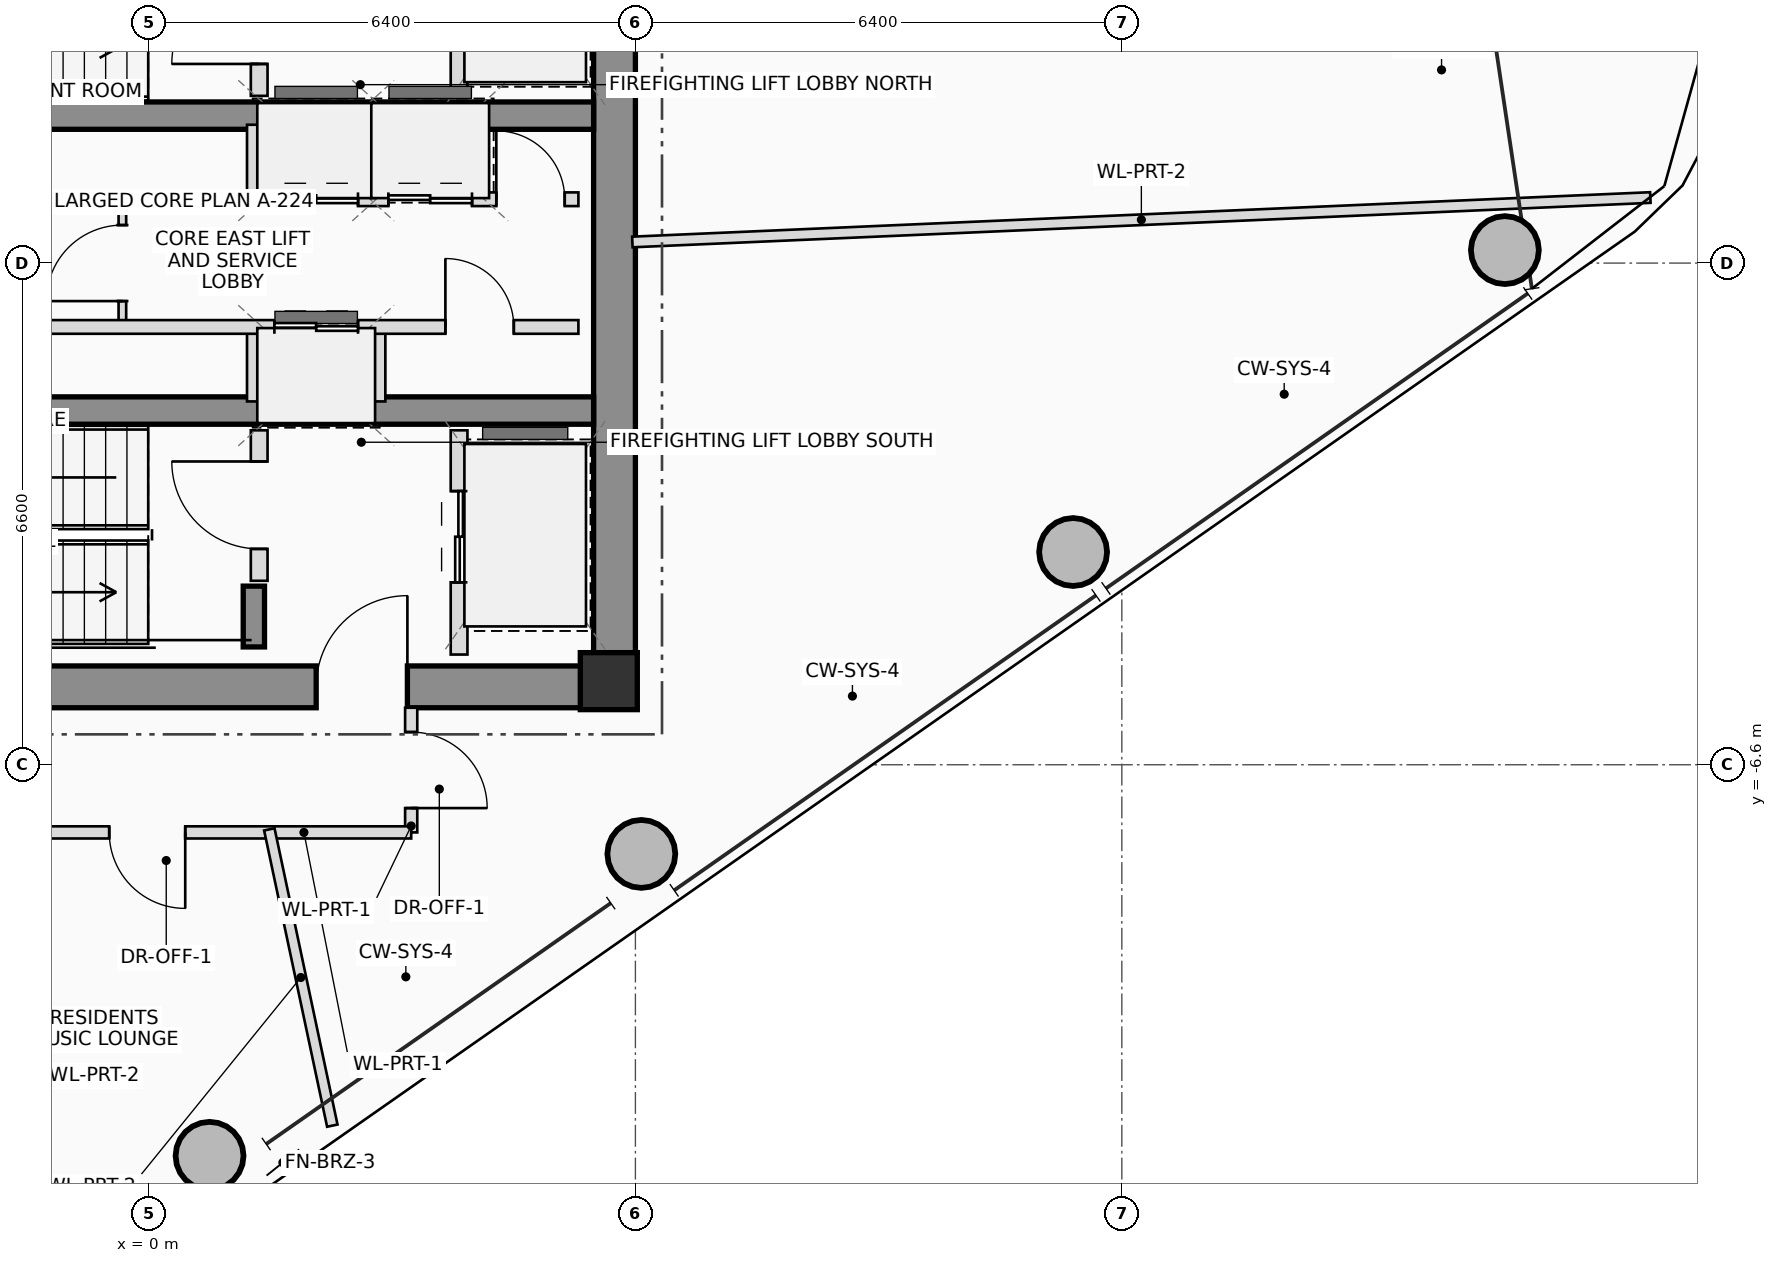
"""IFC4 building model, lengths in metres.
Left out: names, types, materials, properties, quantities, classifications, styles, units other than length and angle.
Written with IfcOpenShell. Run it as: python <this file> out.ifc"""

import sys

from ifc_helpers import new_model, si_unit, direction, frame, frame_2d, origin, origin_2d, place, context, subcontext, project, spatial, rectangle, hollow_circle, extrude, source, transform, mapped, element, fill, save


model = new_model("IFC4")
c1 = context("Model", 3, precision=1e-05, world=origin(), true_north=direction((0.0, 1.0)))
c2 = subcontext(c1, "Body", "Model", "MODEL_VIEW")
j1 = project(units=[si_unit("LENGTHUNIT", "METRE"), si_unit("PLANEANGLEUNIT", "RADIAN")], contexts=[c1])
p1 = place(None, origin())
s1 = spatial("IfcSite", under=j1, at=p1, CompositionType="ELEMENT")
p2 = place(p1, origin())
s2 = spatial("IfcBuilding", under=s1, at=p2, CompositionType="ELEMENT")
p3 = place(p2, frame((0.0, 0.0, 257.55)))
s3 = spatial("IfcBuildingStorey", under=s2, at=p3, CompositionType="ELEMENT", Elevation=257.55)
m1 = source(origin(), c2, "Body", "SweptSolid", [
    extrude(rectangle(XDim=0.75, YDim=0.75, at=origin_2d()), origin(), (0.0, 0.0, 1.0), 3.4),
])
p4 = place(p3, frame((6.05, -5.5, 0.0), z_axis=(0.0, 0.0, 1.0), x_axis=(1.0, 0.0, 0.0)))
e1 = element("IfcColumn", 1, at=p4, inside=s3, PredefinedType="COLUMN", context=c2, shape_type="MappedRepresentation", body=[
    mapped(m1, transform((0.0, 0.0, 0.0), scale=1.0)),
])
p5 = place(p3, frame((-6.4, -5.575, 0.0), z_axis=(0.0, 0.0, 1.0), x_axis=(1.0, 0.0, 0.0)))
e2 = element("IfcWall", 2, at=p5, inside=s3, PredefinedType="SHEAR", context=c2, shape_type="SweptSolid", body=[
    extrude(rectangle(XDim=12.8, YDim=0.55, at=frame_2d((6.4, 0.0))), origin(), (0.0, 0.0, 1.0), 3.4),
])
p6 = place(p5, frame((8.6, 0.0, 0.0)))
e3 = element("IfcOpeningElement", 3, at=p6, cuts=e2, PredefinedType="OPENING", context=c2, shape_type="SweptSolid", body=[
    extrude(rectangle(XDim=1.2, YDim=2.2, at=frame_2d((0.6, 1.1))), frame((0.0, 0.285, 0.0), z_axis=(0.0, -1.0, 0.0), x_axis=(1.0, 0.0, 0.0)), (0.0, 0.0, 1.0), 0.57),
])
p7 = place(p3, frame((6.125, -5.3, 0.0), z_axis=(0.0, 0.0, 1.0), x_axis=(0.0, 1.0, 0.0)))
e4 = element("IfcWall", 4, at=p7, inside=s3, PredefinedType="SHEAR", context=c2, shape_type="SweptSolid", body=[
    extrude(rectangle(XDim=10.6, YDim=0.55, at=frame_2d((5.3, 0.0))), origin(), (0.0, 0.0, 1.0), 3.4),
])
for number, where, z_axis, x_axis in (
    (5, (-5.85, 1.94, 0.0), (0.0, 0.0, 1.0), (1.0, 0.0, 0.0)),
    (6, (-5.85, -1.94, 0.0), (0.0, 0.0, 1.0), (1.0, 0.0, 0.0)),
):
    element("IfcWall", number, at=place(p3, frame(where, z_axis=z_axis, x_axis=x_axis)), inside=s3, PredefinedType="SHEAR", context=c2, shape_type="SweptSolid", body=[
        extrude(rectangle(XDim=11.7, YDim=0.36, at=frame_2d((5.85, 0.0))), origin(), (0.0, 0.0, 1.0), 3.4),
    ])
p8 = place(p3, frame((1.38, -5.05, 0.0), z_axis=(0.0, 0.0, 1.0), x_axis=(0.0, 1.0, 0.0)))
e7 = element("IfcWall", 7, at=p8, inside=s3, PredefinedType="SHEAR", context=c2, shape_type="SweptSolid", body=[
    extrude(rectangle(XDim=0.8, YDim=0.28, at=frame_2d((0.4, 0.0))), origin(), (0.0, 0.0, 1.0), 3.4),
])
m2 = source(origin(), c2, "Body", "SweptSolid", [
    extrude(hollow_circle(Radius=0.45, WallThickness=0.032, at=origin_2d()), origin(), (0.0, 0.0, 1.0), 3.4),
])
for number, where, z_axis, x_axis in (
    (8, (0.797, -11.745, 0.0), (0.0, 0.0, 1.0), (1.0, 0.0, 0.0)),
    (9, (6.478, -7.773, 0.0), (0.0, 0.0, 1.0), (1.0, 0.0, 0.0)),
    (10, (12.159, -3.801, 0.0), (0.0, 0.0, 1.0), (1.0, 0.0, 0.0)),
    (11, (17.84, 0.171, 0.0), (0.0, 0.0, 1.0), (1.0, 0.0, 0.0)),
):
    element("IfcColumn", number, at=place(p3, frame(where, z_axis=z_axis, x_axis=x_axis)), inside=s3, PredefinedType="COLUMN", context=c2, shape_type="MappedRepresentation", body=[
        mapped(m2, transform((0.0, 0.0, 0.0), scale=1.0)),
    ])
p9 = place(p3, frame((1.45, 2.2, 0.0), z_axis=(0.0, 0.0, 1.0), x_axis=(0.0, 1.0, 0.0)))
e12 = element("IfcWall", 12, at=p9, inside=s3, PredefinedType="PLUMBINGWALL", context=c2, shape_type="SweptSolid", body=[
    extrude(rectangle(XDim=1.98, YDim=0.22, at=frame_2d((0.99, 0.0))), origin(), (0.0, 0.0, 1.0), 3.2),
])
p10 = place(p9, frame((0.42, 0.0, 0.0)))
e13 = element("IfcOpeningElement", 13, at=p10, cuts=e12, PredefinedType="OPENING", context=c2, shape_type="SweptSolid", body=[
    extrude(rectangle(XDim=1.15, YDim=2.15, at=frame_2d((0.575, 1.075))), frame((0.0, 0.12, 0.0), z_axis=(0.0, -1.0, 0.0), x_axis=(1.0, 0.0, 0.0)), (0.0, 0.0, 1.0), 0.24),
])
p11 = place(p3, frame((4.08, 2.2, 0.0), z_axis=(0.0, 0.0, 1.0), x_axis=(0.0, 1.0, 0.0)))
e14 = element("IfcWall", 14, at=p11, inside=s3, PredefinedType="PLUMBINGWALL", context=c2, shape_type="SweptSolid", body=[
    extrude(rectangle(XDim=2.95, YDim=0.22, at=frame_2d((1.475, 0.0))), origin(), (0.0, 0.0, 1.0), 3.2),
])
p12 = place(p11, frame((0.75, 0.0, 0.0)))
e15 = element("IfcOpeningElement", 15, at=p12, cuts=e14, PredefinedType="OPENING", context=c2, shape_type="SweptSolid", body=[
    extrude(rectangle(XDim=1.2, YDim=2.25, at=frame_2d((0.6, 1.125))), frame((0.0, 0.12, 0.0), z_axis=(0.0, -1.0, 0.0), x_axis=(1.0, 0.0, 0.0)), (0.0, 0.0, 1.0), 0.24),
])
p13 = place(p3, frame((1.45, -4.18, 0.0), z_axis=(0.0, 0.0, 1.0), x_axis=(0.0, 1.0, 0.0)))
e16 = element("IfcWall", 16, at=p13, inside=s3, PredefinedType="PLUMBINGWALL", context=c2, shape_type="SweptSolid", body=[
    extrude(rectangle(XDim=1.98, YDim=0.22, at=frame_2d((0.99, 0.0))), origin(), (0.0, 0.0, 1.0), 3.2),
])
p14 = place(p13, frame((0.42, 0.0, 0.0)))
e17 = element("IfcOpeningElement", 17, at=p14, cuts=e16, PredefinedType="OPENING", context=c2, shape_type="SweptSolid", body=[
    extrude(rectangle(XDim=1.15, YDim=2.15, at=frame_2d((0.575, 1.075))), frame((0.0, 0.12, 0.0), z_axis=(0.0, -1.0, 0.0), x_axis=(1.0, 0.0, 0.0)), (0.0, 0.0, 1.0), 0.24),
])
p15 = place(p3, frame((4.08, -5.15, 0.0), z_axis=(0.0, 0.0, 1.0), x_axis=(0.0, 1.0, 0.0)))
e18 = element("IfcWall", 18, at=p15, inside=s3, PredefinedType="PLUMBINGWALL", context=c2, shape_type="SweptSolid", body=[
    extrude(rectangle(XDim=2.95, YDim=0.22, at=frame_2d((1.475, 0.0))), origin(), (0.0, 0.0, 1.0), 3.2),
])
p16 = place(p15, frame((0.95, 0.0, 0.0)))
e19 = element("IfcOpeningElement", 19, at=p16, cuts=e18, PredefinedType="OPENING", context=c2, shape_type="SweptSolid", body=[
    extrude(rectangle(XDim=1.2, YDim=2.25, at=frame_2d((0.6, 1.125))), frame((0.0, 0.12, 0.0), z_axis=(0.0, -1.0, 0.0), x_axis=(1.0, 0.0, 0.0)), (0.0, 0.0, 1.0), 0.24),
])
p17 = place(p3, frame((-0.35, -0.84, 0.0), z_axis=(0.0, 0.0, 1.0), x_axis=(0.0, 1.0, 0.0)))
e20 = element("IfcWall", 20, at=p17, inside=s3, PredefinedType="PARTITIONING", context=c2, shape_type="SweptSolid", body=[
    extrude(rectangle(XDim=1.68, YDim=0.1, at=frame_2d((0.84, 0.0))), origin(), (0.0, 0.0, 1.0), 3.2),
])
p18 = place(p17, frame((0.34, 0.0, 0.0)))
e21 = element("IfcOpeningElement", 21, at=p18, cuts=e20, PredefinedType="OPENING", context=c2, shape_type="SweptSolid", body=[
    extrude(rectangle(XDim=1.0, YDim=2.25, at=frame_2d((0.5, 1.125))), frame((0.0, 0.06, 0.0), z_axis=(0.0, -1.0, 0.0), x_axis=(1.0, 0.0, 0.0)), (0.0, 0.0, 1.0), 0.12),
])
for number, where, z_axis, x_axis in (
    (22, (1.38, 0.84, 0.0), (0.0, 0.0, 1.0), (0.0, 1.0, 0.0)),
    (23, (1.38, -1.82, 0.0), (0.0, 0.0, 1.0), (0.0, 1.0, 0.0)),
    (24, (3.02, 0.84, 0.0), (0.0, 0.0, 1.0), (0.0, 1.0, 0.0)),
    (25, (4.38, 0.84, 0.0), (0.0, 0.0, 1.0), (0.0, 1.0, 0.0)),
    (26, (3.02, -1.82, 0.0), (0.0, 0.0, 1.0), (0.0, 1.0, 0.0)),
):
    element("IfcWall", number, at=place(p3, frame(where, z_axis=z_axis, x_axis=x_axis)), inside=s3, PredefinedType="PLUMBINGWALL", context=c2, shape_type="SweptSolid", body=[
        extrude(rectangle(XDim=0.98, YDim=0.18, at=frame_2d((0.49, 0.0))), origin(), (0.0, 0.0, 1.0), 3.2),
    ])
p19 = place(p3, frame((-5.68, 0.84, 0.0), z_axis=(0.0, 0.0, 1.0), x_axis=(1.0, 0.0, 0.0)))
e27 = element("IfcWall", 27, at=p19, inside=s3, PredefinedType="PLUMBINGWALL", context=c2, shape_type="SweptSolid", body=[
    extrude(rectangle(XDim=11.33, YDim=0.18, at=frame_2d((5.665, 0.0))), origin(), (0.0, 0.0, 1.0), 3.2),
])
p20 = place(p19, frame((3.13, 0.0, 0.0)))
e28 = element("IfcOpeningElement", 28, at=p20, cuts=e27, PredefinedType="OPENING", context=c2, shape_type="SweptSolid", body=[
    extrude(rectangle(XDim=0.9, YDim=2.05, at=frame_2d((0.45, 1.025))), frame((0.0, 0.1, 0.0), z_axis=(0.0, -1.0, 0.0), x_axis=(1.0, 0.0, 0.0)), (0.0, 0.0, 1.0), 0.2),
])
p21 = place(p19, frame((7.33, 0.0, 0.0)))
e29 = element("IfcOpeningElement", 29, at=p21, cuts=e27, PredefinedType="OPENING", context=c2, shape_type="SweptSolid", body=[
    extrude(rectangle(XDim=1.1, YDim=2.2, at=frame_2d((0.55, 1.1))), frame((0.0, 0.1, 0.0), z_axis=(0.0, -1.0, 0.0), x_axis=(1.0, 0.0, 0.0)), (0.0, 0.0, 1.0), 0.2),
])
p22 = place(p19, frame((8.83, 0.0, 0.0)))
e30 = element("IfcOpeningElement", 30, at=p22, cuts=e27, PredefinedType="OPENING", context=c2, shape_type="SweptSolid", body=[
    extrude(rectangle(XDim=1.1, YDim=2.2, at=frame_2d((0.55, 1.1))), frame((0.0, 0.1, 0.0), z_axis=(0.0, -1.0, 0.0), x_axis=(1.0, 0.0, 0.0)), (0.0, 0.0, 1.0), 0.2),
])
p23 = place(p19, frame((10.25, 0.0, 0.0)))
e31 = element("IfcOpeningElement", 31, at=p23, cuts=e27, PredefinedType="OPENING", context=c2, shape_type="SweptSolid", body=[
    extrude(rectangle(XDim=0.9, YDim=2.05, at=frame_2d((0.45, 1.025))), frame((0.0, 0.1, 0.0), z_axis=(0.0, -1.0, 0.0), x_axis=(1.0, 0.0, 0.0)), (0.0, 0.0, 1.0), 0.2),
])
p24 = place(p3, frame((-5.68, -0.84, 0.0), z_axis=(0.0, 0.0, 1.0), x_axis=(1.0, 0.0, 0.0)))
e32 = element("IfcWall", 32, at=p24, inside=s3, PredefinedType="PLUMBINGWALL", context=c2, shape_type="SweptSolid", body=[
    extrude(rectangle(XDim=11.33, YDim=0.18, at=frame_2d((5.665, 0.0))), origin(), (0.0, 0.0, 1.0), 3.2),
])
p25 = place(p24, frame((3.13, 0.0, 0.0)))
e33 = element("IfcOpeningElement", 33, at=p25, cuts=e32, PredefinedType="OPENING", context=c2, shape_type="SweptSolid", body=[
    extrude(rectangle(XDim=0.9, YDim=2.05, at=frame_2d((0.45, 1.025))), frame((0.0, 0.1, 0.0), z_axis=(0.0, -1.0, 0.0), x_axis=(1.0, 0.0, 0.0)), (0.0, 0.0, 1.0), 0.2),
])
p26 = place(p24, frame((7.33, 0.0, 0.0)))
e34 = element("IfcOpeningElement", 34, at=p26, cuts=e32, PredefinedType="OPENING", context=c2, shape_type="SweptSolid", body=[
    extrude(rectangle(XDim=1.1, YDim=2.2, at=frame_2d((0.55, 1.1))), frame((0.0, 0.1, 0.0), z_axis=(0.0, -1.0, 0.0), x_axis=(1.0, 0.0, 0.0)), (0.0, 0.0, 1.0), 0.2),
])
p27 = place(p24, frame((9.58, 0.0, 0.0)))
e35 = element("IfcOpeningElement", 35, at=p27, cuts=e32, PredefinedType="OPENING", context=c2, shape_type="SweptSolid", body=[
    extrude(rectangle(XDim=0.9, YDim=2.05, at=frame_2d((0.45, 1.025))), frame((0.0, 0.1, 0.0), z_axis=(0.0, -1.0, 0.0), x_axis=(1.0, 0.0, 0.0)), (0.0, 0.0, 1.0), 0.2),
])
p28 = place(p3, frame((3.45, -5.85, 0.0), z_axis=(0.0, 0.0, 1.0), x_axis=(0.0, -1.0, 0.0)))
e36 = element("IfcWall", 36, at=p28, inside=s3, PredefinedType="PARTITIONING", context=c2, shape_type="SweptSolid", body=[
    extrude(rectangle(XDim=1.64, YDim=0.16, at=frame_2d((0.82, 0.0))), origin(), (0.0, 0.0, 1.0), 3.2),
])
p29 = place(p28, frame((0.32, 0.0, 0.0)))
e37 = element("IfcOpeningElement", 37, at=p29, cuts=e36, PredefinedType="OPENING", context=c2, shape_type="SweptSolid", body=[
    extrude(rectangle(XDim=1.0, YDim=2.25, at=frame_2d((0.5, 1.125))), frame((0.0, 0.09, 0.0), z_axis=(0.0, -1.0, 0.0), x_axis=(1.0, 0.0, 0.0)), (0.0, 0.0, 1.0), 0.18),
])
p30 = place(p3, frame((3.45, -7.49, 0.0), z_axis=(0.0, 0.0, 1.0), x_axis=(-1.0, 0.0, 0.0)))
e38 = element("IfcWall", 38, at=p30, inside=s3, PredefinedType="PARTITIONING", context=c2, shape_type="SweptSolid", body=[
    extrude(rectangle(XDim=9.81, YDim=0.16, at=frame_2d((4.905, 0.0))), origin(), (0.0, 0.0, 1.0), 2.605),
])
p31 = place(p30, frame((2.973, 0.0, 0.0)))
e39 = element("IfcOpeningElement", 39, at=p31, cuts=e38, PredefinedType="OPENING", context=c2, shape_type="SweptSolid", body=[
    extrude(rectangle(XDim=1.0, YDim=2.25, at=frame_2d((0.5, 1.125))), frame((0.0, 0.09, 0.0), z_axis=(0.0, -1.0, 0.0), x_axis=(1.0, 0.0, 0.0)), (0.0, 0.0, 1.0), 0.18),
])
p32 = place(p30, frame((6.865, 0.0, 0.0)))
e40 = element("IfcOpeningElement", 40, at=p32, cuts=e38, PredefinedType="OPENING", context=c2, shape_type="SweptSolid", body=[
    extrude(rectangle(XDim=1.0, YDim=2.25, at=frame_2d((0.5, 1.125))), frame((0.0, 0.09, 0.0), z_axis=(0.0, -1.0, 0.0), x_axis=(1.0, 0.0, 0.0)), (0.0, 0.0, 1.0), 0.18),
])
p33 = place(p3, frame((6.36, 0.278, 0.0), z_axis=(0.0, 0.0, 1.0), x_axis=(0.999047617824, 0.043633213494, 0.0)))
e41 = element("IfcWall", 41, at=p33, inside=s3, PredefinedType="PARTITIONING", context=c2, shape_type="SweptSolid", body=[
    extrude(rectangle(XDim=13.406, YDim=0.14, at=frame_2d((6.703, 0.0))), origin(), (0.0, 0.0, 1.0), 2.605),
])
p34 = place(p3, frame((1.583, -7.45, 0.0), z_axis=(0.0, 0.0, 1.0), x_axis=(0.207930561362, -0.978143589485, 0.0)))
e42 = element("IfcWall", 42, at=p34, inside=s3, PredefinedType="PARTITIONING", context=c2, shape_type="SweptSolid", body=[
    extrude(rectangle(XDim=3.985, YDim=0.14, at=frame_2d((1.993, 0.0))), origin(), (0.0, 0.0, 1.0), 2.605),
])
p35 = place(p6, origin())
e43 = element("IfcDoor", 43, at=p35, inside=s3, OperationType="SINGLE_SWING_RIGHT", PredefinedType="DOOR", context=c2, shape_type="SweptSolid", body=[
    extrude(rectangle(XDim=1.2, YDim=2.2, at=frame_2d((0.6, 1.1))), frame((0.0, 0.025, 0.0), z_axis=(0.0, -1.0, 0.0), x_axis=(1.0, 0.0, 0.0)), (0.0, 0.0, 1.0), 0.05),
])
fill(e3, e43)
p36 = place(p10, origin())
e44 = element("IfcDoor", 44, at=p36, inside=s3, OperationType="SINGLE_SWING_LEFT", PredefinedType="DOOR", context=c2, shape_type="SweptSolid", body=[
    extrude(rectangle(XDim=1.15, YDim=2.15, at=frame_2d((0.575, 1.075))), frame((0.0, 0.025, 0.0), z_axis=(0.0, -1.0, 0.0), x_axis=(1.0, 0.0, 0.0)), (0.0, 0.0, 1.0), 0.05),
])
fill(e13, e44)
p37 = place(p14, origin())
e45 = element("IfcDoor", 45, at=p37, inside=s3, OperationType="SINGLE_SWING_RIGHT", PredefinedType="DOOR", context=c2, shape_type="SweptSolid", body=[
    extrude(rectangle(XDim=1.15, YDim=2.15, at=frame_2d((0.575, 1.075))), frame((0.0, 0.025, 0.0), z_axis=(0.0, -1.0, 0.0), x_axis=(1.0, 0.0, 0.0)), (0.0, 0.0, 1.0), 0.05),
])
fill(e17, e45)
p38 = place(p16, origin())
e46 = element("IfcDoor", 46, at=p38, inside=s3, OperationType="DOUBLE_DOOR_SLIDING", PredefinedType="DOOR", context=c2, shape_type="SweptSolid", body=[
    extrude(rectangle(XDim=1.2, YDim=2.25, at=frame_2d((0.6, 1.125))), frame((0.0, 0.025, 0.0), z_axis=(0.0, -1.0, 0.0), x_axis=(1.0, 0.0, 0.0)), (0.0, 0.0, 1.0), 0.05),
])
fill(e19, e46)
p39 = place(p18, origin())
e47 = element("IfcDoor", 47, at=p39, inside=s3, OperationType="SINGLE_SWING_LEFT", PredefinedType="DOOR", context=c2, shape_type="SweptSolid", body=[
    extrude(rectangle(XDim=1.0, YDim=2.25, at=frame_2d((0.5, 1.125))), frame((0.0, 0.025, 0.0), z_axis=(0.0, -1.0, 0.0), x_axis=(1.0, 0.0, 0.0)), (0.0, 0.0, 1.0), 0.05),
])
fill(e21, e47)
p40 = place(p21, origin())
e48 = element("IfcDoor", 48, at=p40, inside=s3, OperationType="DOUBLE_DOOR_SLIDING", PredefinedType="DOOR", context=c2, shape_type="SweptSolid", body=[
    extrude(rectangle(XDim=1.1, YDim=2.2, at=frame_2d((0.55, 1.1))), frame((0.0, 0.025, 0.0), z_axis=(0.0, -1.0, 0.0), x_axis=(1.0, 0.0, 0.0)), (0.0, 0.0, 1.0), 0.05),
])
fill(e29, e48)
p41 = place(p22, origin())
e49 = element("IfcDoor", 49, at=p41, inside=s3, OperationType="DOUBLE_DOOR_SLIDING", PredefinedType="DOOR", context=c2, shape_type="SweptSolid", body=[
    extrude(rectangle(XDim=1.1, YDim=2.2, at=frame_2d((0.55, 1.1))), frame((0.0, 0.025, 0.0), z_axis=(0.0, -1.0, 0.0), x_axis=(1.0, 0.0, 0.0)), (0.0, 0.0, 1.0), 0.05),
])
fill(e30, e49)
p42 = place(p23, origin())
e50 = element("IfcDoor", 50, at=p42, inside=s3, OperationType="SINGLE_SWING_LEFT", PredefinedType="DOOR", context=c2, shape_type="SweptSolid", body=[
    extrude(rectangle(XDim=0.9, YDim=2.05, at=frame_2d((0.45, 1.025))), frame((0.0, 0.025, 0.0), z_axis=(0.0, -1.0, 0.0), x_axis=(1.0, 0.0, 0.0)), (0.0, 0.0, 1.0), 0.05),
])
fill(e31, e50)
p43 = place(p26, origin())
e51 = element("IfcDoor", 51, at=p43, inside=s3, OperationType="DOUBLE_DOOR_SLIDING", PredefinedType="DOOR", context=c2, shape_type="SweptSolid", body=[
    extrude(rectangle(XDim=1.1, YDim=2.2, at=frame_2d((0.55, 1.1))), frame((0.0, 0.025, 0.0), z_axis=(0.0, -1.0, 0.0), x_axis=(1.0, 0.0, 0.0)), (0.0, 0.0, 1.0), 0.05),
])
fill(e34, e51)
p44 = place(p27, origin())
e52 = element("IfcDoor", 52, at=p44, inside=s3, OperationType="SINGLE_SWING_LEFT", PredefinedType="DOOR", context=c2, shape_type="SweptSolid", body=[
    extrude(rectangle(XDim=0.9, YDim=2.05, at=frame_2d((0.45, 1.025))), frame((0.0, 0.025, 0.0), z_axis=(0.0, -1.0, 0.0), x_axis=(1.0, 0.0, 0.0)), (0.0, 0.0, 1.0), 0.05),
])
fill(e35, e52)
p45 = place(p29, origin())
e53 = element("IfcDoor", 53, at=p45, inside=s3, OperationType="SINGLE_SWING_RIGHT", PredefinedType="DOOR", context=c2, shape_type="SweptSolid", body=[
    extrude(rectangle(XDim=1.0, YDim=2.25, at=frame_2d((0.5, 1.125))), frame((0.0, 0.025, 0.0), z_axis=(0.0, -1.0, 0.0), x_axis=(1.0, 0.0, 0.0)), (0.0, 0.0, 1.0), 0.05),
])
fill(e37, e53)
p46 = place(p31, origin())
e54 = element("IfcDoor", 54, at=p46, inside=s3, OperationType="SINGLE_SWING_LEFT", PredefinedType="DOOR", context=c2, shape_type="SweptSolid", body=[
    extrude(rectangle(XDim=1.0, YDim=2.25, at=frame_2d((0.5, 1.125))), frame((0.0, 0.025, 0.0), z_axis=(0.0, -1.0, 0.0), x_axis=(1.0, 0.0, 0.0)), (0.0, 0.0, 1.0), 0.05),
])
fill(e39, e54)
save(model, sys.argv[1])
